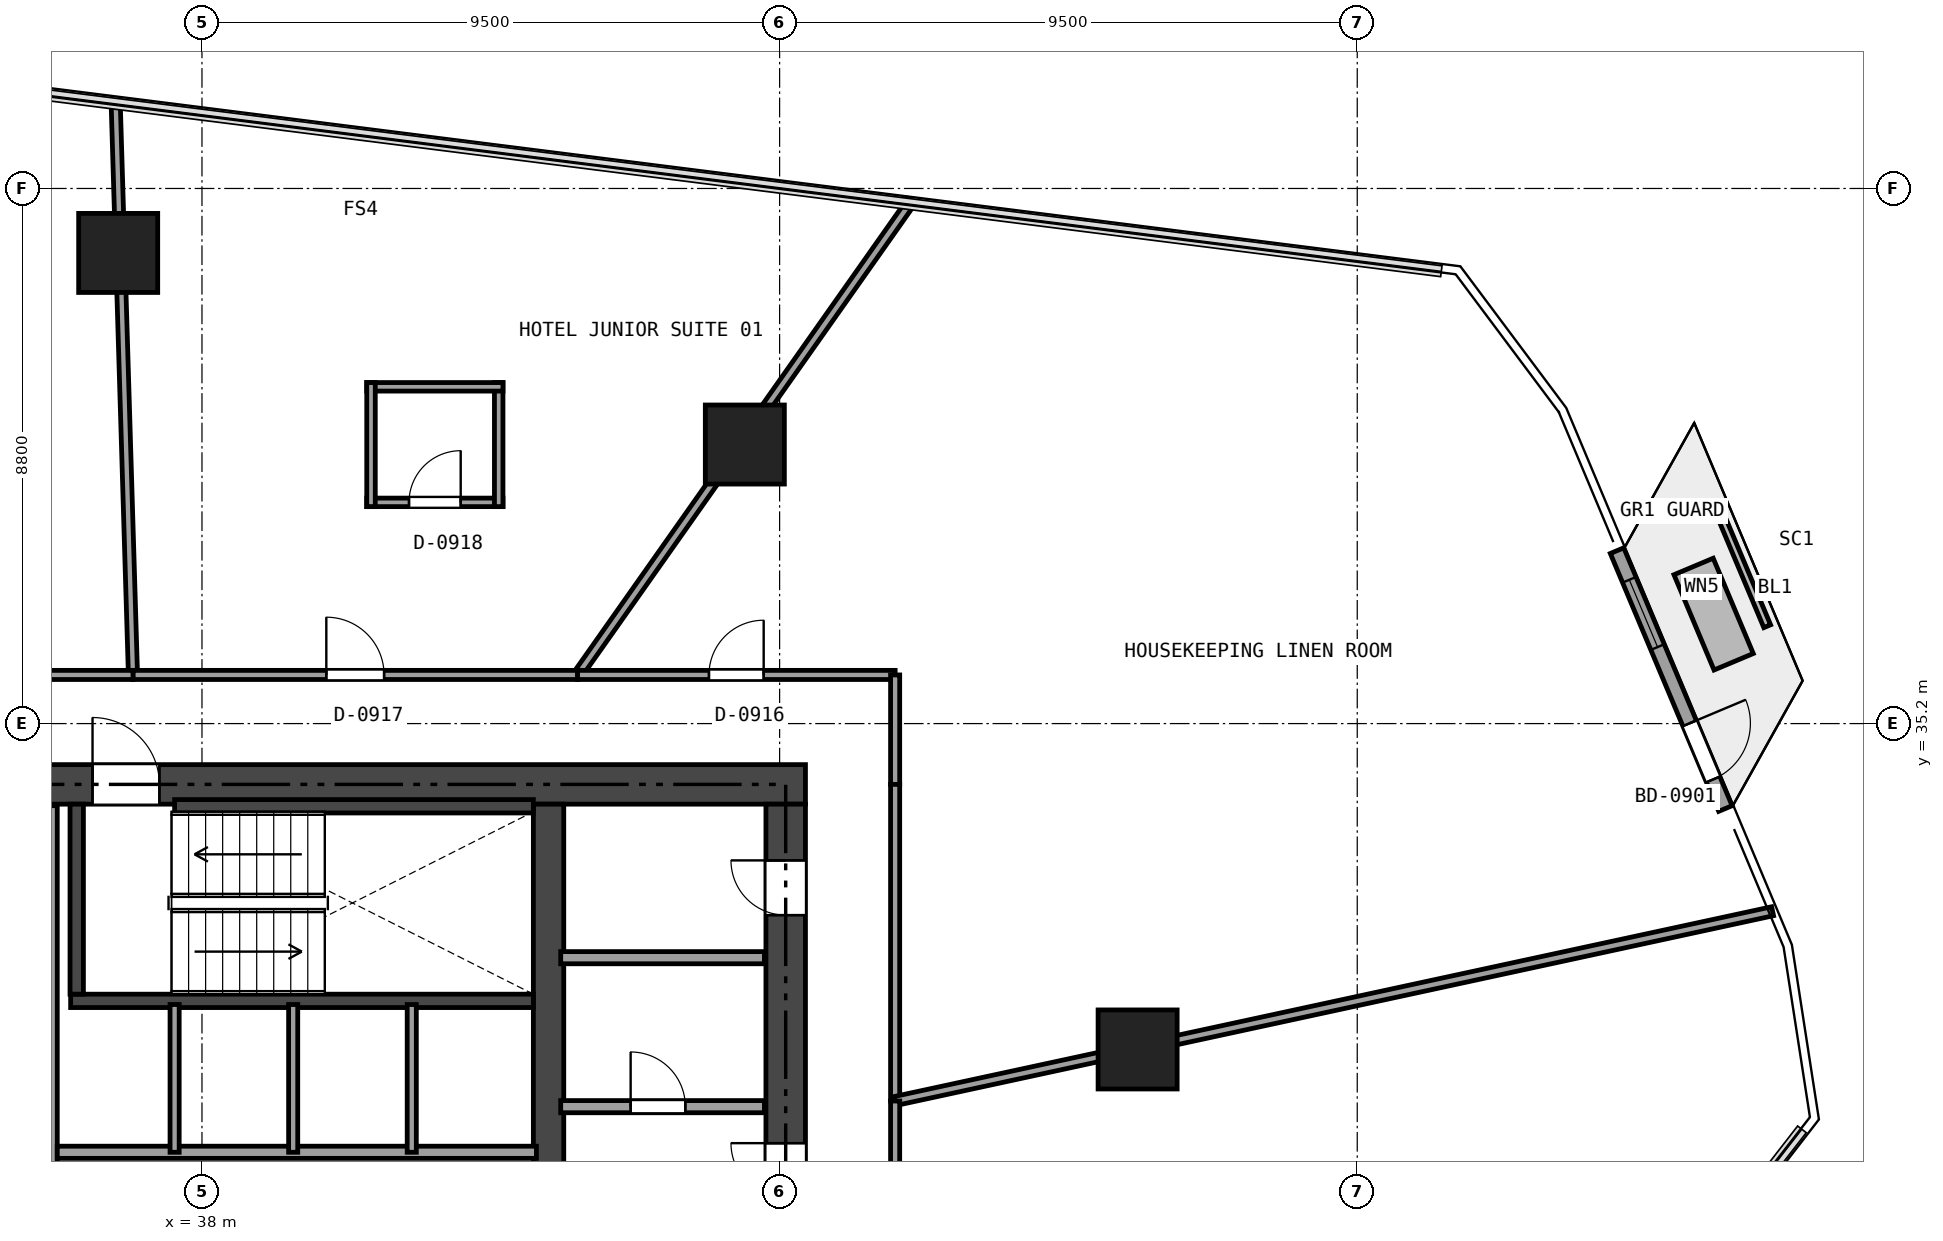
"""IFC4 building model, lengths in metres.
Left out: names, types, materials, properties, quantities, classifications, styles, units other than length and angle.
Written with IfcOpenShell. Run it as: python <this file> out.ifc"""

import sys

from ifc_helpers import new_model, si_unit, direction, frame, frame_2d, origin, origin_2d, place, context, subcontext, project, spatial, rectangle, extrude, element, fill, save


model = new_model("IFC4")
c1 = context("Model", 3, precision=1e-05, world=origin(), true_north=direction((0.0, 1.0)))
c2 = subcontext(c1, "Body", "Model", "MODEL_VIEW")
j1 = project(units=[si_unit("LENGTHUNIT", "METRE"), si_unit("PLANEANGLEUNIT", "RADIAN")], contexts=[c1])
p1 = place(None, origin())
s1 = spatial("IfcSite", under=j1, at=p1, CompositionType="ELEMENT")
p2 = place(p1, origin())
s2 = spatial("IfcBuilding", under=s1, at=p2, CompositionType="ELEMENT")
p3 = place(p2, frame((0.0, 0.0, 40.8)))
s3 = spatial("IfcBuildingStorey", under=s2, at=p3, CompositionType="ELEMENT", Elevation=40.8)
p4 = place(p3, frame((26.475, 34.2, 0.0), z_axis=(0.0, 0.0, 1.0), x_axis=(1.0, 0.0, 0.0)))
e1 = element("IfcWall", 1, at=p4, inside=s3, PredefinedType="SHEAR", context=c2, shape_type="SweptSolid", body=[
    extrude(rectangle(XDim=21.45, YDim=0.65, at=frame_2d((10.725, 0.0))), origin(), (0.0, 0.0, 1.0), 3.17),
])
p5 = place(p4, frame((9.725, 0.0, 0.0)))
e2 = element("IfcOpeningElement", 2, at=p5, cuts=e1, PredefinedType="OPENING", context=c2, shape_type="SweptSolid", body=[
    extrude(rectangle(XDim=1.1, YDim=2.15, at=frame_2d((0.55, 1.075))), frame((0.0, 0.335, 0.0), z_axis=(0.0, -1.0, 0.0), x_axis=(1.0, 0.0, 0.0)), (0.0, 0.0, 1.0), 0.67),
])
p6 = place(p4, frame((1.975, 0.0, 0.0)))
e3 = element("IfcOpeningElement", 3, at=p6, cuts=e1, PredefinedType="OPENING", context=c2, shape_type="SweptSolid", body=[
    extrude(rectangle(XDim=0.9, YDim=2.1, at=frame_2d((0.45, 1.05))), frame((0.0, 0.335, 0.0), z_axis=(0.0, -1.0, 0.0), x_axis=(1.0, 0.0, 0.0)), (0.0, 0.0, 1.0), 0.67),
])
p7 = place(p4, frame((6.275, 0.0, 0.0)))
e4 = element("IfcOpeningElement", 4, at=p7, cuts=e1, PredefinedType="OPENING", context=c2, shape_type="SweptSolid", body=[
    extrude(rectangle(XDim=0.9, YDim=2.1, at=frame_2d((0.45, 1.05))), frame((0.0, 0.335, 0.0), z_axis=(0.0, -1.0, 0.0), x_axis=(1.0, 0.0, 0.0)), (0.0, 0.0, 1.0), 0.67),
])
p8 = place(p3, frame((47.6, 18.925, 0.0), z_axis=(0.0, 0.0, 1.0), x_axis=(0.0, 1.0, 0.0)))
e5 = element("IfcWall", 5, at=p8, inside=s3, PredefinedType="SHEAR", context=c2, shape_type="SweptSolid", body=[
    extrude(rectangle(XDim=14.95, YDim=0.65, at=frame_2d((7.475, 0.0))), origin(), (0.0, 0.0, 1.0), 3.17),
])
p9 = place(p8, frame((6.575, 0.0, 0.0)))
e6 = element("IfcOpeningElement", 6, at=p9, cuts=e5, PredefinedType="OPENING", context=c2, shape_type="SweptSolid", body=[
    extrude(rectangle(XDim=1.1, YDim=2.15, at=frame_2d((0.55, 1.075))), frame((0.0, 0.335, 0.0), z_axis=(0.0, -1.0, 0.0), x_axis=(1.0, 0.0, 0.0)), (0.0, 0.0, 1.0), 0.67),
])
p10 = place(p8, frame((8.475, 0.0, 0.0)))
e7 = element("IfcOpeningElement", 7, at=p10, cuts=e5, PredefinedType="OPENING", context=c2, shape_type="SweptSolid", body=[
    extrude(rectangle(XDim=0.9, YDim=2.1, at=frame_2d((0.45, 1.05))), frame((0.0, 0.335, 0.0), z_axis=(0.0, -1.0, 0.0), x_axis=(1.0, 0.0, 0.0)), (0.0, 0.0, 1.0), 0.67),
])
p11 = place(p8, frame((13.125, 0.0, 0.0)))
e8 = element("IfcOpeningElement", 8, at=p11, cuts=e5, PredefinedType="OPENING", context=c2, shape_type="SweptSolid", body=[
    extrude(rectangle(XDim=0.9, YDim=2.1, at=frame_2d((0.45, 1.05))), frame((0.0, 0.335, 0.0), z_axis=(0.0, -1.0, 0.0), x_axis=(1.0, 0.0, 0.0)), (0.0, 0.0, 1.0), 0.67),
])
p12 = place(p3, frame((43.7, 18.925, 0.0), z_axis=(0.0, 0.0, 1.0), x_axis=(0.0, 1.0, 0.0)))
e9 = element("IfcWall", 9, at=p12, inside=s3, PredefinedType="SHEAR", context=c2, shape_type="SweptSolid", body=[
    extrude(rectangle(XDim=14.95, YDim=0.5, at=frame_2d((7.475, 0.0))), origin(), (0.0, 0.0, 1.0), 3.17),
])
p13 = place(p12, frame((8.075, 0.0, 0.0)))
e10 = element("IfcOpeningElement", 10, at=p13, cuts=e9, PredefinedType="OPENING", context=c2, shape_type="SweptSolid", body=[
    extrude(rectangle(XDim=0.9, YDim=2.1, at=frame_2d((0.45, 1.05))), frame((0.0, 0.26, 0.0), z_axis=(0.0, -1.0, 0.0), x_axis=(1.0, 0.0, 0.0)), (0.0, 0.0, 1.0), 0.52),
])
p14 = place(p3, frame((35.84, 30.64, 0.0), z_axis=(0.0, 0.0, 1.0), x_axis=(1.0, 0.0, 0.0)))
e11 = element("IfcWall", 11, at=p14, inside=s3, PredefinedType="SHEAR", context=c2, shape_type="SweptSolid", body=[
    extrude(rectangle(XDim=7.61, YDim=0.22, at=frame_2d((3.805, 0.0))), origin(), (0.0, 0.0, 1.0), 3.17),
])
p15 = place(p3, frame((35.94, 30.75, 0.0), z_axis=(0.0, 0.0, 1.0), x_axis=(0.0, 1.0, 0.0)))
e12 = element("IfcWall", 12, at=p15, inside=s3, PredefinedType="SHEAR", context=c2, shape_type="SweptSolid", body=[
    extrude(rectangle(XDim=3.125, YDim=0.22, at=frame_2d((1.562, 0.0))), origin(), (0.0, 0.0, 1.0), 3.17),
])
p16 = place(p3, frame((37.55, 33.84, 0.0), z_axis=(0.0, 0.0, 1.0), x_axis=(1.0, 0.0, 0.0)))
e13 = element("IfcWall", 13, at=p16, inside=s3, PredefinedType="SHEAR", context=c2, shape_type="SweptSolid", body=[
    extrude(rectangle(XDim=5.9, YDim=0.22, at=frame_2d((2.95, 0.0))), origin(), (0.0, 0.0, 1.0), 3.17),
])
for number, where, z_axis, x_axis in (
    (14, (53.388, 29.841, 0.0), (0.0, 0.0, 1.0), (1.0, 0.0, 0.0)),
    (15, (46.928, 39.789, 0.0), (0.0, 0.0, 1.0), (1.0, 0.0, 0.0)),
    (16, (36.622, 42.94, 0.0), (0.0, 0.0, 1.0), (1.0, 0.0, 0.0)),
):
    element("IfcColumn", number, at=place(p3, frame(where, z_axis=z_axis, x_axis=x_axis)), inside=s3, PredefinedType="COLUMN", context=c2, shape_type="SweptSolid", body=[
        extrude(rectangle(XDim=1.3, YDim=1.3, at=origin_2d()), origin(), (0.0, 0.0, 1.0), 3.17),
    ])
p17 = place(p3, frame((61.273, 38.044, 0.0), z_axis=(0.0, 0.0, 1.0), x_axis=(0.387375943156, -0.92192183978, 0.0)))
e17 = element("IfcWall", 17, at=p17, inside=s3, PredefinedType="SOLIDWALL", context=c2, shape_type="SweptSolid", body=[
    extrude(rectangle(XDim=4.6, YDim=0.24, at=frame_2d((2.3, 0.0))), origin(), (0.0, 0.0, 1.0), 3.17),
])
p18 = place(p17, frame((3.08, 0.0, 0.0)))
e18 = element("IfcOpeningElement", 18, at=p18, cuts=e17, PredefinedType="OPENING", context=c2, shape_type="SweptSolid", body=[
    extrude(rectangle(XDim=1.0, YDim=2.15, at=frame_2d((0.5, 1.075))), frame((0.0, 0.13, 0.0), z_axis=(0.0, -1.0, 0.0), x_axis=(1.0, 0.0, 0.0)), (0.0, 0.0, 1.0), 0.26),
])
p19 = place(p17, frame((0.52, 0.0, 0.2)))
e19 = element("IfcOpeningElement", 19, at=p19, cuts=e17, PredefinedType="OPENING", context=c2, shape_type="SweptSolid", body=[
    extrude(rectangle(XDim=1.2, YDim=1.8, at=frame_2d((0.6, 0.9))), frame((0.0, 0.13, 0.0), z_axis=(0.0, -1.0, 0.0), x_axis=(1.0, 0.0, 0.0)), (0.0, 0.0, 1.0), 0.26),
])
p20 = place(p3, frame((43.9, 28.9, 0.0), z_axis=(0.0, 0.0, 1.0), x_axis=(1.0, 0.0, 0.0)))
e20 = element("IfcWall", 20, at=p20, inside=s3, PredefinedType="SOLIDWALL", context=c2, shape_type="SweptSolid", body=[
    extrude(rectangle(XDim=3.35, YDim=0.2, at=frame_2d((1.675, 0.0))), origin(), (0.0, 0.0, 1.0), 3.17),
])
p21 = place(p20, frame((1.15, 0.0, 0.0)))
e21 = element("IfcOpeningElement", 21, at=p21, cuts=e20, PredefinedType="OPENING", context=c2, shape_type="SweptSolid", body=[
    extrude(rectangle(XDim=0.9, YDim=2.1, at=frame_2d((0.45, 1.05))), frame((0.0, 0.11, 0.0), z_axis=(0.0, -1.0, 0.0), x_axis=(1.0, 0.0, 0.0)), (0.0, 0.0, 1.0), 0.22),
])
p22 = place(p3, frame((43.9, 31.35, 0.0), z_axis=(0.0, 0.0, 1.0), x_axis=(1.0, 0.0, 0.0)))
e22 = element("IfcWall", 22, at=p22, inside=s3, PredefinedType="SOLIDWALL", context=c2, shape_type="SweptSolid", body=[
    extrude(rectangle(XDim=3.35, YDim=0.2, at=frame_2d((1.675, 0.0))), origin(), (0.0, 0.0, 1.0), 3.17),
])
p23 = place(p3, frame((35.52, 18.95, 0.0), z_axis=(0.0, 0.0, 1.0), x_axis=(0.0, 1.0, 0.0)))
e23 = element("IfcWall", 23, at=p23, inside=s3, PredefinedType="SOLIDWALL", context=c2, shape_type="SweptSolid", body=[
    extrude(rectangle(XDim=14.9, YDim=0.2, at=frame_2d((7.45, 0.0))), origin(), (0.0, 0.0, 1.0), 2.691),
])
p24 = place(p23, frame((7.755, 0.0, 0.0)))
e24 = element("IfcOpeningElement", 24, at=p24, cuts=e23, PredefinedType="OPENING", context=c2, shape_type="SweptSolid", body=[
    extrude(rectangle(XDim=0.95, YDim=2.15, at=frame_2d((0.475, 1.075))), frame((0.0, 0.11, 0.0), z_axis=(0.0, -1.0, 0.0), x_axis=(1.0, 0.0, 0.0)), (0.0, 0.0, 1.0), 0.22),
])
p25 = place(p23, frame((0.6, 0.0, 0.0)))
e25 = element("IfcOpeningElement", 25, at=p25, cuts=e23, PredefinedType="OPENING", context=c2, shape_type="SweptSolid", body=[
    extrude(rectangle(XDim=0.9, YDim=2.1, at=frame_2d((0.45, 1.05))), frame((0.0, 0.11, 0.0), z_axis=(0.0, -1.0, 0.0), x_axis=(1.0, 0.0, 0.0)), (0.0, 0.0, 1.0), 0.22),
])
p26 = place(p3, frame((35.62, 28.15, 0.0), z_axis=(0.0, 0.0, 1.0), x_axis=(1.0, 0.0, 0.0)))
e26 = element("IfcWall", 26, at=p26, inside=s3, PredefinedType="SOLIDWALL", context=c2, shape_type="SweptSolid", body=[
    extrude(rectangle(XDim=7.88, YDim=0.2, at=frame_2d((3.94, 0.0))), origin(), (0.0, 0.0, 1.0), 3.17),
])
for number, where, z_axis, x_axis in (
    (27, (37.55, 28.15, 0.0), (0.0, 0.0, 1.0), (0.0, 1.0, 0.0)),
    (28, (39.5, 28.15, 0.0), (0.0, 0.0, 1.0), (0.0, 1.0, 0.0)),
    (29, (41.45, 28.15, 0.0), (0.0, 0.0, 1.0), (0.0, 1.0, 0.0)),
):
    element("IfcWall", number, at=place(p3, frame(where, z_axis=z_axis, x_axis=x_axis)), inside=s3, PredefinedType="PARTITIONING", context=c2, shape_type="SweptSolid", body=[
        extrude(rectangle(XDim=2.43, YDim=0.15, at=frame_2d((1.215, 0.0))), origin(), (0.0, 0.0, 1.0), 3.17),
    ])
p27 = place(p3, frame((40.71, 38.838, 0.0), z_axis=(0.0, 0.0, 1.0), x_axis=(1.0, 0.0, 0.0)))
e30 = element("IfcWall", 30, at=p27, inside=s3, PredefinedType="PARTITIONING", context=c2, shape_type="SweptSolid", body=[
    extrude(rectangle(XDim=2.24, YDim=0.14, at=frame_2d((1.12, 0.0))), origin(), (0.0, 0.0, 1.0), 3.17),
])
p28 = place(p27, frame((0.695, 0.0, 0.0)))
e31 = element("IfcOpeningElement", 31, at=p28, cuts=e30, PredefinedType="OPENING", context=c2, shape_type="SweptSolid", body=[
    extrude(rectangle(XDim=0.85, YDim=2.1, at=frame_2d((0.425, 1.05))), frame((0.0, 0.08, 0.0), z_axis=(0.0, -1.0, 0.0), x_axis=(1.0, 0.0, 0.0)), (0.0, 0.0, 1.0), 0.16),
])
p29 = place(p3, frame((42.88, 38.768, 0.0), z_axis=(0.0, 0.0, 1.0), x_axis=(0.0, 1.0, 0.0)))
e32 = element("IfcWall", 32, at=p29, inside=s3, PredefinedType="PARTITIONING", context=c2, shape_type="SweptSolid", body=[
    extrude(rectangle(XDim=2.04, YDim=0.14, at=frame_2d((1.02, 0.0))), origin(), (0.0, 0.0, 1.0), 3.17),
])
p30 = place(p3, frame((42.95, 40.738, 0.0), z_axis=(0.0, 0.0, 1.0), x_axis=(-1.0, 0.0, 0.0)))
e33 = element("IfcWall", 33, at=p30, inside=s3, PredefinedType="PARTITIONING", context=c2, shape_type="SweptSolid", body=[
    extrude(rectangle(XDim=2.24, YDim=0.14, at=frame_2d((1.12, 0.0))), origin(), (0.0, 0.0, 1.0), 3.17),
])
p31 = place(p3, frame((40.78, 40.808, 0.0), z_axis=(0.0, 0.0, 1.0), x_axis=(0.0, -1.0, 0.0)))
e34 = element("IfcWall", 34, at=p31, inside=s3, PredefinedType="PARTITIONING", context=c2, shape_type="SweptSolid", body=[
    extrude(rectangle(XDim=2.04, YDim=0.14, at=frame_2d((1.02, 0.0))), origin(), (0.0, 0.0, 1.0), 3.17),
])
p32 = place(p3, frame((49.668, 43.79, 0.0), z_axis=(0.0, 0.0, 1.0), x_axis=(-0.576267813241, -0.817260917592, 0.0)))
e35 = element("IfcWall", 35, at=p32, inside=s3, PredefinedType="PARTITIONING", context=c2, shape_type="SweptSolid", body=[
    extrude(rectangle(XDim=9.532, YDim=0.15, at=frame_2d((4.766, 0.0))), origin(), (0.0, 0.0, 1.0), 2.395),
])
p33 = place(p3, frame((44.175, 36.0, 0.0), z_axis=(0.0, 0.0, 1.0), x_axis=(1.0, 0.0, 0.0)))
e36 = element("IfcWall", 36, at=p33, inside=s3, PredefinedType="PARTITIONING", context=c2, shape_type="SweptSolid", body=[
    extrude(rectangle(XDim=5.225, YDim=0.15, at=frame_2d((2.612, 0.0))), origin(), (0.0, 0.0, 1.0), 2.355),
])
p34 = place(p33, frame((2.163, 0.0, 0.0)))
e37 = element("IfcOpeningElement", 37, at=p34, cuts=e36, PredefinedType="OPENING", context=c2, shape_type="SweptSolid", body=[
    extrude(rectangle(XDim=0.9, YDim=2.0, at=frame_2d((0.45, 1.0))), frame((0.0, 0.085, 0.0), z_axis=(0.0, -1.0, 0.0), x_axis=(1.0, 0.0, 0.0)), (0.0, 0.0, 1.0), 0.17),
])
p35 = place(p3, frame((49.4, 36.0, 0.0), z_axis=(0.0, 0.0, 1.0), x_axis=(0.0, -1.0, 0.0)))
e38 = element("IfcWall", 38, at=p35, inside=s3, PredefinedType="PARTITIONING", context=c2, shape_type="SweptSolid", body=[
    extrude(rectangle(XDim=1.8, YDim=0.15, at=frame_2d((0.9, 0.0))), origin(), (0.0, 0.0, 1.0), 2.355),
])
p36 = place(p3, frame((49.4, 34.2, 0.0), z_axis=(0.0, 0.0, 1.0), x_axis=(0.0, -1.0, 0.0)))
e39 = element("IfcWall", 39, at=p36, inside=s3, PredefinedType="PARTITIONING", context=c2, shape_type="SweptSolid", body=[
    extrude(rectangle(XDim=5.207, YDim=0.15, at=frame_2d((2.604, 0.0))), origin(), (0.0, 0.0, 1.0), 2.395),
])
p37 = place(p3, frame((49.4, 28.993, 0.0), z_axis=(0.0, 0.0, 1.0), x_axis=(0.977402348029, 0.211387440656, 0.0)))
e40 = element("IfcWall", 40, at=p37, inside=s3, PredefinedType="PARTITIONING", context=c2, shape_type="SweptSolid", body=[
    extrude(rectangle(XDim=14.765, YDim=0.15, at=frame_2d((7.382, 0.0))), origin(), (0.0, 0.0, 1.0), 2.395),
])
p38 = place(p3, frame((36.58, 45.434, 0.0), z_axis=(0.0, 0.0, 1.0), x_axis=(0.03018653739, -0.999544282641, 0.0)))
e41 = element("IfcWall", 41, at=p38, inside=s3, PredefinedType="PARTITIONING", context=c2, shape_type="SweptSolid", body=[
    extrude(rectangle(XDim=9.438, YDim=0.15, at=frame_2d((4.719, 0.0))), origin(), (0.0, 0.0, 1.0), 2.395),
])
p39 = place(p3, frame((36.865, 36.0, 0.0), z_axis=(0.0, 0.0, 1.0), x_axis=(1.0, 0.0, 0.0)))
e42 = element("IfcWall", 42, at=p39, inside=s3, PredefinedType="PARTITIONING", context=c2, shape_type="SweptSolid", body=[
    extrude(rectangle(XDim=7.31, YDim=0.15, at=frame_2d((3.655, 0.0))), origin(), (0.0, 0.0, 1.0), 2.395),
])
p40 = place(p39, frame((3.18, 0.0, 0.0)))
e43 = element("IfcOpeningElement", 43, at=p40, cuts=e42, PredefinedType="OPENING", context=c2, shape_type="SweptSolid", body=[
    extrude(rectangle(XDim=0.95, YDim=2.15, at=frame_2d((0.475, 1.075))), frame((0.0, 0.085, 0.0), z_axis=(0.0, -1.0, 0.0), x_axis=(1.0, 0.0, 0.0)), (0.0, 0.0, 1.0), 0.17),
])
p41 = place(p3, frame((29.7, 36.0, 0.0), z_axis=(0.0, 0.0, 1.0), x_axis=(1.0, 0.0, 0.0)))
e44 = element("IfcWall", 44, at=p41, inside=s3, PredefinedType="PARTITIONING", context=c2, shape_type="SweptSolid", body=[
    extrude(rectangle(XDim=7.165, YDim=0.15, at=frame_2d((3.583, 0.0))), origin(), (0.0, 0.0, 1.0), 2.395),
])
p42 = place(p41, frame((3.108, 0.0, 0.0)))
e45 = element("IfcOpeningElement", 45, at=p42, cuts=e44, PredefinedType="OPENING", context=c2, shape_type="SweptSolid", body=[
    extrude(rectangle(XDim=0.95, YDim=2.15, at=frame_2d((0.475, 1.075))), frame((0.0, 0.085, 0.0), z_axis=(0.0, -1.0, 0.0), x_axis=(1.0, 0.0, 0.0)), (0.0, 0.0, 1.0), 0.17),
])
p43 = place(p3, frame((49.4, 28.993, 0.0), z_axis=(0.0, 0.0, 1.0), x_axis=(0.0, -1.0, 0.0)))
e46 = element("IfcWall", 46, at=p43, inside=s3, PredefinedType="PARTITIONING", context=c2, shape_type="SweptSolid", body=[
    extrude(rectangle(XDim=7.033, YDim=0.15, at=frame_2d((3.517, 0.0))), origin(), (0.0, 0.0, 1.0), 2.395),
])
p44 = place(p43, frame((3.041, 0.0, 0.0)))
e47 = element("IfcOpeningElement", 47, at=p44, cuts=e46, PredefinedType="OPENING", context=c2, shape_type="SweptSolid", body=[
    extrude(rectangle(XDim=0.95, YDim=2.15, at=frame_2d((0.475, 1.075))), frame((0.0, 0.085, 0.0), z_axis=(0.0, -1.0, 0.0), x_axis=(1.0, 0.0, 0.0)), (0.0, 0.0, 1.0), 0.17),
])
p45 = place(p18, origin())
e48 = element("IfcDoor", 48, at=p45, inside=s3, OperationType="SINGLE_SWING_LEFT", PredefinedType="DOOR", context=c2, shape_type="SweptSolid", body=[
    extrude(rectangle(XDim=1.0, YDim=2.15, at=frame_2d((0.5, 1.075))), frame((0.0, 0.025, 0.0), z_axis=(0.0, -1.0, 0.0), x_axis=(1.0, 0.0, 0.0)), (0.0, 0.0, 1.0), 0.05),
])
fill(e18, e48)
p46 = place(p19, origin())
e49 = element("IfcWindow", 49, at=p46, inside=s3, PartitioningType="SINGLE_PANEL", PredefinedType="WINDOW", context=c2, shape_type="SweptSolid", body=[
    extrude(rectangle(XDim=1.2, YDim=1.8, at=frame_2d((0.6, 0.9))), frame((0.0, 0.03, 0.0), z_axis=(0.0, -1.0, 0.0), x_axis=(1.0, 0.0, 0.0)), (0.0, 0.0, 1.0), 0.06),
])
fill(e19, e49)
p47 = place(p5, origin())
e50 = element("IfcDoor", 50, at=p47, inside=s3, OperationType="SINGLE_SWING_LEFT", PredefinedType="DOOR", context=c2, shape_type="SweptSolid", body=[
    extrude(rectangle(XDim=1.1, YDim=2.15, at=frame_2d((0.55, 1.075))), frame((0.0, 0.025, 0.0), z_axis=(0.0, -1.0, 0.0), x_axis=(1.0, 0.0, 0.0)), (0.0, 0.0, 1.0), 0.05),
])
fill(e2, e50)
p48 = place(p10, origin())
e51 = element("IfcDoor", 51, at=p48, inside=s3, OperationType="SINGLE_SWING_RIGHT", PredefinedType="DOOR", context=c2, shape_type="SweptSolid", body=[
    extrude(rectangle(XDim=0.9, YDim=2.1, at=frame_2d((0.45, 1.05))), frame((0.0, 0.025, 0.0), z_axis=(0.0, -1.0, 0.0), x_axis=(1.0, 0.0, 0.0)), (0.0, 0.0, 1.0), 0.05),
])
fill(e7, e51)
p49 = place(p21, origin())
e52 = element("IfcDoor", 52, at=p49, inside=s3, OperationType="SINGLE_SWING_LEFT", PredefinedType="DOOR", context=c2, shape_type="SweptSolid", body=[
    extrude(rectangle(XDim=0.9, YDim=2.1, at=frame_2d((0.45, 1.05))), frame((0.0, 0.025, 0.0), z_axis=(0.0, -1.0, 0.0), x_axis=(1.0, 0.0, 0.0)), (0.0, 0.0, 1.0), 0.05),
])
fill(e21, e52)
p50 = place(p11, origin())
e53 = element("IfcDoor", 53, at=p50, inside=s3, OperationType="SINGLE_SWING_RIGHT", PredefinedType="DOOR", context=c2, shape_type="SweptSolid", body=[
    extrude(rectangle(XDim=0.9, YDim=2.1, at=frame_2d((0.45, 1.05))), frame((0.0, 0.025, 0.0), z_axis=(0.0, -1.0, 0.0), x_axis=(1.0, 0.0, 0.0)), (0.0, 0.0, 1.0), 0.05),
])
fill(e8, e53)
p51 = place(p34, origin())
e54 = element("IfcDoor", 54, at=p51, inside=s3, OperationType="SINGLE_SWING_RIGHT", PredefinedType="DOOR", context=c2, shape_type="SweptSolid", body=[
    extrude(rectangle(XDim=0.9, YDim=2.0, at=frame_2d((0.45, 1.0))), frame((0.0, 0.025, 0.0), z_axis=(0.0, -1.0, 0.0), x_axis=(1.0, 0.0, 0.0)), (0.0, 0.0, 1.0), 0.05),
])
fill(e37, e54)
p52 = place(p40, origin())
e55 = element("IfcDoor", 55, at=p52, inside=s3, OperationType="SINGLE_SWING_LEFT", PredefinedType="DOOR", context=c2, shape_type="SweptSolid", body=[
    extrude(rectangle(XDim=0.95, YDim=2.15, at=frame_2d((0.475, 1.075))), frame((0.0, 0.025, 0.0), z_axis=(0.0, -1.0, 0.0), x_axis=(1.0, 0.0, 0.0)), (0.0, 0.0, 1.0), 0.05),
])
fill(e43, e55)
p53 = place(p28, origin())
e56 = element("IfcDoor", 56, at=p53, inside=s3, OperationType="SINGLE_SWING_RIGHT", PredefinedType="DOOR", context=c2, shape_type="SweptSolid", body=[
    extrude(rectangle(XDim=0.85, YDim=2.1, at=frame_2d((0.425, 1.05))), frame((0.0, 0.025, 0.0), z_axis=(0.0, -1.0, 0.0), x_axis=(1.0, 0.0, 0.0)), (0.0, 0.0, 1.0), 0.05),
])
fill(e31, e56)
save(model, sys.argv[1])
